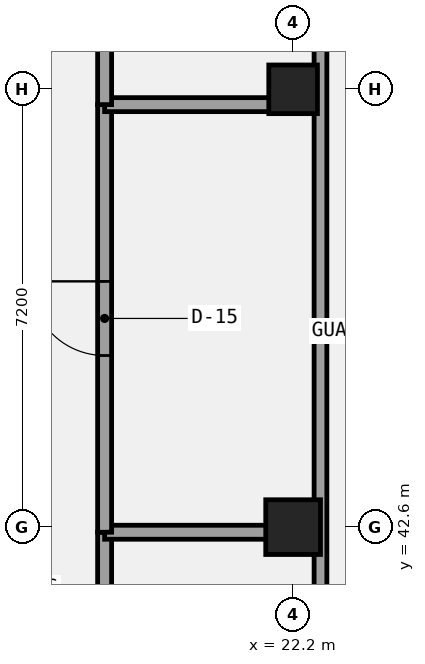
"""IFC4 building model, lengths in metres.
Left out: names, types, materials, properties, quantities, classifications, styles, units other than length and angle.
Written with IfcOpenShell. Run it as: python <this file> out.ifc"""

import sys

from ifc_helpers import new_model, si_unit, direction, frame, frame_2d, origin, origin_2d, place, context, subcontext, project, spatial, rectangle, extrude, element, fill, save


model = new_model("IFC4")
c1 = context("Model", 3, precision=1e-05, world=origin(), true_north=direction((0.0, 1.0)))
c2 = subcontext(c1, "Body", "Model", "MODEL_VIEW")
j1 = project(units=[si_unit("LENGTHUNIT", "METRE"), si_unit("PLANEANGLEUNIT", "RADIAN")], contexts=[c1])
p1 = place(None, origin())
s1 = spatial("IfcSite", under=j1, at=p1, CompositionType="ELEMENT")
p2 = place(p1, origin())
s2 = spatial("IfcBuilding", under=s1, at=p2, CompositionType="ELEMENT")
p3 = place(p2, frame((0.0, 0.0, -4.2)))
s3 = spatial("IfcBuildingStorey", under=s2, at=p3, CompositionType="ELEMENT", Elevation=-4.2)
p4 = place(p3, frame((22.2, 42.6, 0.0), z_axis=(0.0, 0.0, 1.0), x_axis=(1.0, 0.0, 0.0)))
e1 = element("IfcColumn", 1, at=p4, inside=s3, PredefinedType="COLUMN", context=c2, shape_type="SweptSolid", body=[
    extrude(rectangle(XDim=0.9, YDim=0.9, at=origin_2d()), origin(), (0.0, 0.0, 1.0), 4.2),
])
p5 = place(p3, frame((22.2, 49.8, 0.0), z_axis=(0.0, 0.0, 1.0), x_axis=(1.0, 0.0, 0.0)))
e2 = element("IfcColumn", 2, at=p5, inside=s3, PredefinedType="COLUMN", context=c2, shape_type="SweptSolid", body=[
    extrude(rectangle(XDim=0.8, YDim=0.8, at=origin_2d()), origin(), (0.0, 0.0, 1.0), 4.2),
])
p6 = place(p3, frame((22.65, 24.6, 0.0), z_axis=(0.0, 0.0, 1.0), x_axis=(0.0, 1.0, 0.0)))
e3 = element("IfcWall", 3, at=p6, inside=s3, PredefinedType="PARTITIONING", context=c2, shape_type="SweptSolid", body=[
    extrude(rectangle(XDim=32.0, YDim=0.21, at=frame_2d((16.0, 0.0))), origin(), (0.0, 0.0, 1.0), 3.88),
])
p7 = place(p3, frame((19.1, 35.484, 0.0), z_axis=(0.0, 0.0, 1.0), x_axis=(0.0, 1.0, 0.0)))
e4 = element("IfcWall", 4, at=p7, inside=s3, PredefinedType="PARTITIONING", context=c2, shape_type="SweptSolid", body=[
    extrude(rectangle(XDim=7.032, YDim=0.23, at=frame_2d((3.516, 0.0))), origin(), (0.0, 0.0, 1.0), 3.88),
])
p8 = place(p7, frame((2.906, 0.0, 0.0)))
e5 = element("IfcOpeningElement", 5, at=p8, cuts=e4, PredefinedType="OPENING", context=c2, shape_type="SweptSolid", body=[
    extrude(rectangle(XDim=1.22, YDim=2.22, at=frame_2d((0.61, 1.11))), frame((0.0, 0.125, 0.0), z_axis=(0.0, -1.0, 0.0), x_axis=(1.0, 0.0, 0.0)), (0.0, 0.0, 1.0), 0.25),
])
p9 = place(p3, frame((19.1, 42.516, 0.0), z_axis=(0.0, 0.0, 1.0), x_axis=(1.0, 0.0, 0.0)))
e6 = element("IfcWall", 6, at=p9, inside=s3, PredefinedType="PARTITIONING", context=c2, shape_type="SweptSolid", body=[
    extrude(rectangle(XDim=3.1, YDim=0.23, at=frame_2d((1.55, 0.0))), origin(), (0.0, 0.0, 1.0), 3.33),
])
p10 = place(p3, frame((19.1, 42.516, 0.0), z_axis=(0.0, 0.0, 1.0), x_axis=(0.0, 1.0, 0.0)))
e7 = element("IfcWall", 7, at=p10, inside=s3, PredefinedType="PARTITIONING", context=c2, shape_type="SweptSolid", body=[
    extrude(rectangle(XDim=7.032, YDim=0.23, at=frame_2d((3.516, 0.0))), origin(), (0.0, 0.0, 1.0), 3.88),
])
p11 = place(p10, frame((2.906, 0.0, 0.0)))
e8 = element("IfcOpeningElement", 8, at=p11, cuts=e7, PredefinedType="OPENING", context=c2, shape_type="SweptSolid", body=[
    extrude(rectangle(XDim=1.22, YDim=2.35, at=frame_2d((0.61, 1.175))), frame((0.0, 0.125, 0.0), z_axis=(0.0, -1.0, 0.0), x_axis=(1.0, 0.0, 0.0)), (0.0, 0.0, 1.0), 0.25),
])
p12 = place(p3, frame((19.1, 49.548, 0.0), z_axis=(0.0, 0.0, 1.0), x_axis=(1.0, 0.0, 0.0)))
e9 = element("IfcWall", 9, at=p12, inside=s3, PredefinedType="PARTITIONING", context=c2, shape_type="SweptSolid", body=[
    extrude(rectangle(XDim=3.1, YDim=0.23, at=frame_2d((1.55, 0.0))), origin(), (0.0, 0.0, 1.0), 3.28),
])
p13 = place(p3, frame((19.1, 49.548, 0.0), z_axis=(0.0, 0.0, 1.0), x_axis=(0.0, 1.0, 0.0)))
e10 = element("IfcWall", 10, at=p13, inside=s3, PredefinedType="PARTITIONING", context=c2, shape_type="SweptSolid", body=[
    extrude(rectangle(XDim=7.032, YDim=0.23, at=frame_2d((3.516, 0.0))), origin(), (0.0, 0.0, 1.0), 3.88),
])
p14 = place(p13, frame((2.836, 0.0, 0.0)))
e11 = element("IfcOpeningElement", 11, at=p14, cuts=e10, PredefinedType="OPENING", context=c2, shape_type="SweptSolid", body=[
    extrude(rectangle(XDim=1.36, YDim=2.1, at=frame_2d((0.68, 1.05))), frame((0.0, 0.125, 0.0), z_axis=(0.0, -1.0, 0.0), x_axis=(1.0, 0.0, 0.0)), (0.0, 0.0, 1.0), 0.25),
])
p15 = place(p11, origin())
e12 = element("IfcDoor", 12, at=p15, inside=s3, OperationType="SINGLE_SWING_RIGHT", PredefinedType="DOOR", context=c2, shape_type="SweptSolid", body=[
    extrude(rectangle(XDim=1.22, YDim=2.35, at=frame_2d((0.61, 1.175))), frame((0.0, 0.025, 0.0), z_axis=(0.0, -1.0, 0.0), x_axis=(1.0, 0.0, 0.0)), (0.0, 0.0, 1.0), 0.05),
])
fill(e8, e12)
save(model, sys.argv[1])
